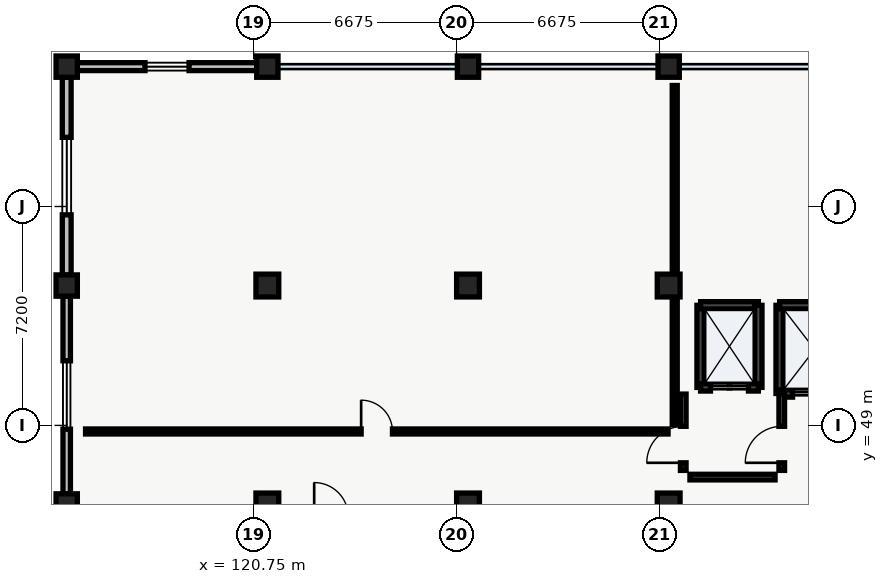
"""IFC4 building model, lengths in metres.
Left out: names, types, materials, properties, quantities, classifications, styles, units other than length and angle.
Written with IfcOpenShell. Run it as: python <this file> out.ifc"""

import sys

from ifc_helpers import new_model, si_unit, direction, frame, frame_2d, origin, origin_2d, place, context, subcontext, project, spatial, rectangle, extrude, element, fill, save


model = new_model("IFC4")
c1 = context("Model", 3, precision=1e-05, world=origin(), true_north=direction((0.0, 1.0)))
c2 = subcontext(c1, "Body", "Model", "MODEL_VIEW")
j1 = project(units=[si_unit("LENGTHUNIT", "METRE"), si_unit("PLANEANGLEUNIT", "RADIAN")], contexts=[c1])
p1 = place(None, origin())
s1 = spatial("IfcSite", under=j1, at=p1, CompositionType="ELEMENT")
p2 = place(p1, origin())
s2 = spatial("IfcBuilding", under=s1, at=p2, CompositionType="ELEMENT")
p3 = place(p2, frame((0.0, 0.0, 5.1)))
s3 = spatial("IfcBuildingStorey", under=s2, at=p3, CompositionType="ELEMENT", Elevation=5.1)
for number, where, z_axis, x_axis in (
    (1, (114.6, 46.4, 0.0), (0.0, 0.0, 1.0), (1.0, 0.0, 0.0)),
    (2, (114.6, 53.6, 0.0), (0.0, 0.0, 1.0), (1.0, 0.0, 0.0)),
    (3, (114.6, 60.8, 0.0), (0.0, 0.0, 1.0), (1.0, 0.0, 0.0)),
):
    element("IfcColumn", number, at=place(p3, frame(where, z_axis=z_axis, x_axis=x_axis)), inside=s3, PredefinedType="COLUMN", context=c2, shape_type="SweptSolid", body=[
        extrude(rectangle(XDim=0.7, YDim=0.7, at=origin_2d()), origin(), (0.0, 0.0, 1.0), 4.29),
    ])
for number, where, z_axis, x_axis in (
    (4, (121.2, 46.4, 0.0), (0.0, 0.0, 1.0), (1.0, 0.0, 0.0)),
    (5, (121.2, 53.6, 0.0), (0.0, 0.0, 1.0), (1.0, 0.0, 0.0)),
):
    element("IfcColumn", number, at=place(p3, frame(where, z_axis=z_axis, x_axis=x_axis)), inside=s3, PredefinedType="COLUMN", context=c2, shape_type="SweptSolid", body=[
        extrude(rectangle(XDim=0.75, YDim=0.75, at=origin_2d()), origin(), (0.0, 0.0, 1.0), 4.29),
    ])
p4 = place(p3, frame((121.2, 60.8, 0.0), z_axis=(0.0, 0.0, 1.0), x_axis=(1.0, 0.0, 0.0)))
e6 = element("IfcColumn", 6, at=p4, inside=s3, PredefinedType="COLUMN", context=c2, shape_type="SweptSolid", body=[
    extrude(rectangle(XDim=0.7, YDim=0.7, at=origin_2d()), origin(), (0.0, 0.0, 1.0), 4.29),
])
for number, where, z_axis, x_axis in (
    (7, (127.8, 46.4, 0.0), (0.0, 0.0, 1.0), (1.0, 0.0, 0.0)),
    (8, (127.8, 53.6, 0.0), (0.0, 0.0, 1.0), (1.0, 0.0, 0.0)),
):
    element("IfcColumn", number, at=place(p3, frame(where, z_axis=z_axis, x_axis=x_axis)), inside=s3, PredefinedType="COLUMN", context=c2, shape_type="SweptSolid", body=[
        extrude(rectangle(XDim=0.75, YDim=0.75, at=origin_2d()), origin(), (0.0, 0.0, 1.0), 4.29),
    ])
p5 = place(p3, frame((127.8, 60.8, 0.0), z_axis=(0.0, 0.0, 1.0), x_axis=(1.0, 0.0, 0.0)))
e9 = element("IfcColumn", 9, at=p5, inside=s3, PredefinedType="COLUMN", context=c2, shape_type="SweptSolid", body=[
    extrude(rectangle(XDim=0.7, YDim=0.7, at=origin_2d()), origin(), (0.0, 0.0, 1.0), 4.29),
])
for number, where, z_axis, x_axis in (
    (10, (134.4, 46.4, 0.0), (0.0, 0.0, 1.0), (1.0, 0.0, 0.0)),
    (11, (134.4, 53.6, 0.0), (0.0, 0.0, 1.0), (1.0, 0.0, 0.0)),
):
    element("IfcColumn", number, at=place(p3, frame(where, z_axis=z_axis, x_axis=x_axis)), inside=s3, PredefinedType="COLUMN", context=c2, shape_type="SweptSolid", body=[
        extrude(rectangle(XDim=0.75, YDim=0.75, at=origin_2d()), origin(), (0.0, 0.0, 1.0), 4.29),
    ])
p6 = place(p3, frame((134.4, 60.8, 0.0), z_axis=(0.0, 0.0, 1.0), x_axis=(1.0, 0.0, 0.0)))
e12 = element("IfcColumn", 12, at=p6, inside=s3, PredefinedType="COLUMN", context=c2, shape_type="SweptSolid", body=[
    extrude(rectangle(XDim=0.7, YDim=0.7, at=origin_2d()), origin(), (0.0, 0.0, 1.0), 4.29),
])
p7 = place(p3, frame((114.6, 46.745, 0.0), z_axis=(0.0, 0.0, 1.0), x_axis=(0.0, 1.0, 0.0)))
e13 = element("IfcWall", 13, at=p7, inside=s3, PredefinedType="STANDARD", context=c2, shape_type="SweptSolid", body=[
    extrude(rectangle(XDim=6.51, YDim=0.245, at=frame_2d((3.255, 0.0))), origin(), (0.0, 0.0, 1.0), 3.775),
])
p8 = place(p7, frame((2.13, 0.0, 0.95)))
e14 = element("IfcOpeningElement", 14, at=p8, cuts=e13, PredefinedType="OPENING", context=c2, shape_type="SweptSolid", body=[
    extrude(rectangle(XDim=2.25, YDim=1.55, at=frame_2d((1.125, 0.775))), frame((0.0, 0.123, 0.0), z_axis=(0.0, -1.0, 0.0), x_axis=(1.0, 0.0, 0.0)), (0.0, 0.0, 1.0), 0.245),
])
p9 = place(p3, frame((114.6, 53.945, 0.0), z_axis=(0.0, 0.0, 1.0), x_axis=(0.0, 1.0, 0.0)))
e15 = element("IfcWall", 15, at=p9, inside=s3, PredefinedType="STANDARD", context=c2, shape_type="SweptSolid", body=[
    extrude(rectangle(XDim=6.51, YDim=0.29, at=frame_2d((3.255, 0.0))), origin(), (0.0, 0.0, 1.0), 3.775),
])
p10 = place(p9, frame((1.98, 0.0, 0.95)))
e16 = element("IfcOpeningElement", 16, at=p10, cuts=e15, PredefinedType="OPENING", context=c2, shape_type="SweptSolid", body=[
    extrude(rectangle(XDim=2.55, YDim=1.75, at=frame_2d((1.275, 0.875))), frame((0.0, 0.145, 0.0), z_axis=(0.0, -1.0, 0.0), x_axis=(1.0, 0.0, 0.0)), (0.0, 0.0, 1.0), 0.29),
])
p11 = place(p3, frame((114.945, 60.8, 0.0), z_axis=(0.0, 0.0, 1.0), x_axis=(1.0, 0.0, 0.0)))
e17 = element("IfcWall", 17, at=p11, inside=s3, PredefinedType="STANDARD", context=c2, shape_type="SweptSolid", body=[
    extrude(rectangle(XDim=5.91, YDim=0.26, at=frame_2d((2.955, 0.0))), origin(), (0.0, 0.0, 1.0), 3.775),
])
p12 = place(p11, frame((2.23, 0.0, 0.95)))
e18 = element("IfcOpeningElement", 18, at=p12, cuts=e17, PredefinedType="OPENING", context=c2, shape_type="SweptSolid", body=[
    extrude(rectangle(XDim=1.45, YDim=1.35, at=frame_2d((0.725, 0.675))), frame((0.0, 0.13, 0.0), z_axis=(0.0, -1.0, 0.0), x_axis=(1.0, 0.0, 0.0)), (0.0, 0.0, 1.0), 0.26),
])
p13 = place(p3, frame((135.45, 50.25, 0.0), z_axis=(0.0, 0.0, 1.0), x_axis=(0.0, 1.0, 0.0)))
e19 = element("IfcWall", 19, at=p13, inside=s3, PredefinedType="SHEAR", context=c2, shape_type="SweptSolid", body=[
    extrude(rectangle(XDim=2.7, YDim=0.24, at=frame_2d((1.35, 0.0))), origin(), (0.0, 0.0, 1.0), 4.28),
])
p14 = place(p3, frame((135.45, 52.95, 0.0), z_axis=(0.0, 0.0, 1.0), x_axis=(1.0, 0.0, 0.0)))
e20 = element("IfcWall", 20, at=p14, inside=s3, PredefinedType="SHEAR", context=c2, shape_type="SweptSolid", body=[
    extrude(rectangle(XDim=1.9, YDim=0.24, at=frame_2d((0.95, 0.0))), origin(), (0.0, 0.0, 1.0), 4.28),
])
p15 = place(p3, frame((137.35, 52.95, 0.0), z_axis=(0.0, 0.0, 1.0), x_axis=(0.0, -1.0, 0.0)))
e21 = element("IfcWall", 21, at=p15, inside=s3, PredefinedType="SHEAR", context=c2, shape_type="SweptSolid", body=[
    extrude(rectangle(XDim=2.7, YDim=0.24, at=frame_2d((1.35, 0.0))), origin(), (0.0, 0.0, 1.0), 4.28),
])
p16 = place(p3, frame((137.35, 50.25, 0.0), z_axis=(0.0, 0.0, 1.0), x_axis=(-1.0, 0.0, 0.0)))
e22 = element("IfcWall", 22, at=p16, inside=s3, PredefinedType="SHEAR", context=c2, shape_type="SweptSolid", body=[
    extrude(rectangle(XDim=1.9, YDim=0.24, at=frame_2d((0.95, 0.0))), origin(), (0.0, 0.0, 1.0), 4.28),
])
p17 = place(p16, frame((0.325, 0.0, 0.0)))
e23 = element("IfcOpeningElement", 23, at=p17, cuts=e22, PredefinedType="OPENING", context=c2, shape_type="SweptSolid", body=[
    extrude(rectangle(XDim=1.25, YDim=2.2, at=frame_2d((0.625, 1.1))), frame((0.0, 0.12, 0.0), z_axis=(0.0, -1.0, 0.0), x_axis=(1.0, 0.0, 0.0)), (0.0, 0.0, 1.0), 0.24),
])
p18 = place(p3, frame((138.05, 50.05, 0.0), z_axis=(0.0, 0.0, 1.0), x_axis=(0.0, 1.0, 0.0)))
e24 = element("IfcWall", 24, at=p18, inside=s3, PredefinedType="SHEAR", context=c2, shape_type="SweptSolid", body=[
    extrude(rectangle(XDim=2.9, YDim=0.24, at=frame_2d((1.45, 0.0))), origin(), (0.0, 0.0, 1.0), 4.28),
])
p19 = place(p3, frame((138.05, 52.95, 0.0), z_axis=(0.0, 0.0, 1.0), x_axis=(1.0, 0.0, 0.0)))
e25 = element("IfcWall", 25, at=p19, inside=s3, PredefinedType="SHEAR", context=c2, shape_type="SweptSolid", body=[
    extrude(rectangle(XDim=2.3, YDim=0.24, at=frame_2d((1.15, 0.0))), origin(), (0.0, 0.0, 1.0), 4.28),
])
p20 = place(p3, frame((140.35, 50.05, 0.0), z_axis=(0.0, 0.0, 1.0), x_axis=(-1.0, 0.0, 0.0)))
e26 = element("IfcWall", 26, at=p20, inside=s3, PredefinedType="SHEAR", context=c2, shape_type="SweptSolid", body=[
    extrude(rectangle(XDim=2.3, YDim=0.24, at=frame_2d((1.15, 0.0))), origin(), (0.0, 0.0, 1.0), 4.28),
])
p21 = place(p20, frame((0.425, 0.0, 0.0)))
e27 = element("IfcOpeningElement", 27, at=p21, cuts=e26, PredefinedType="OPENING", context=c2, shape_type="SweptSolid", body=[
    extrude(rectangle(XDim=1.45, YDim=2.3, at=frame_2d((0.725, 1.15))), frame((0.0, 0.12, 0.0), z_axis=(0.0, -1.0, 0.0), x_axis=(1.0, 0.0, 0.0)), (0.0, 0.0, 1.0), 0.24),
])
p22 = place(p3, frame((135.1, 47.3, 0.0), z_axis=(0.0, 0.0, 1.0), x_axis=(1.0, 0.0, 0.0)))
e28 = element("IfcWall", 28, at=p22, inside=s3, PredefinedType="SOLIDWALL", context=c2, shape_type="SweptSolid", body=[
    extrude(rectangle(XDim=2.8, YDim=0.185, at=frame_2d((1.4, 0.0))), origin(), (0.0, 0.0, 1.0), 3.95),
])
p23 = place(p3, frame((138.12, 47.52, 0.0), z_axis=(0.0, 0.0, 1.0), x_axis=(0.0, 1.0, 0.0)))
e29 = element("IfcWall", 29, at=p23, inside=s3, PredefinedType="SOLIDWALL", context=c2, shape_type="SweptSolid", body=[
    extrude(rectangle(XDim=2.51, YDim=0.185, at=frame_2d((1.255, 0.0))), origin(), (0.0, 0.0, 1.0), 3.95),
])
p24 = place(p23, frame((0.25, 0.0, 0.0)))
e30 = element("IfcOpeningElement", 30, at=p24, cuts=e29, PredefinedType="OPENING", context=c2, shape_type="SweptSolid", body=[
    extrude(rectangle(XDim=1.2, YDim=2.15, at=frame_2d((0.6, 1.075))), frame((0.0, 0.093, 0.0), z_axis=(0.0, -1.0, 0.0), x_axis=(1.0, 0.0, 0.0)), (0.0, 0.0, 1.0), 0.185),
])
p25 = place(p3, frame((134.88, 50.03, 0.0), z_axis=(0.0, 0.0, 1.0), x_axis=(0.0, -1.0, 0.0)))
e31 = element("IfcWall", 31, at=p25, inside=s3, PredefinedType="SOLIDWALL", context=c2, shape_type="SweptSolid", body=[
    extrude(rectangle(XDim=2.51, YDim=0.185, at=frame_2d((1.255, 0.0))), origin(), (0.0, 0.0, 1.0), 3.95),
])
p26 = place(p25, frame((1.06, 0.0, 0.0)))
e32 = element("IfcOpeningElement", 32, at=p26, cuts=e31, PredefinedType="OPENING", context=c2, shape_type="SweptSolid", body=[
    extrude(rectangle(XDim=1.2, YDim=2.15, at=frame_2d((0.6, 1.075))), frame((0.0, 0.093, 0.0), z_axis=(0.0, -1.0, 0.0), x_axis=(1.0, 0.0, 0.0)), (0.0, 0.0, 1.0), 0.185),
])
p27 = place(p3, frame((115.22, 48.8, 0.0), z_axis=(0.0, 0.0, 1.0), x_axis=(1.0, 0.0, 0.0)))
e33 = element("IfcWall", 33, at=p27, inside=s3, PredefinedType="PARTITIONING", context=c2, shape_type="SweptSolid", body=[
    extrude(rectangle(XDim=19.16, YDim=0.165, at=frame_2d((9.58, 0.0))), origin(), (0.0, 0.0, 1.0), 3.875),
])
p28 = place(p27, frame((9.065, 0.0, 0.0)))
e34 = element("IfcOpeningElement", 34, at=p28, cuts=e33, PredefinedType="OPENING", context=c2, shape_type="SweptSolid", body=[
    extrude(rectangle(XDim=1.03, YDim=2.16, at=frame_2d((0.515, 1.08))), frame((0.0, 0.083, 0.0), z_axis=(0.0, -1.0, 0.0), x_axis=(1.0, 0.0, 0.0)), (0.0, 0.0, 1.0), 0.165),
])
p29 = place(p3, frame((134.6, 49.02, 0.0), z_axis=(0.0, 0.0, 1.0), x_axis=(0.0, 1.0, 0.0)))
e35 = element("IfcWall", 35, at=p29, inside=s3, PredefinedType="PARTITIONING", context=c2, shape_type="SweptSolid", body=[
    extrude(rectangle(XDim=11.16, YDim=0.165, at=frame_2d((5.58, 0.0))), origin(), (0.0, 0.0, 1.0), 3.625),
])
p30 = place(p8, origin())
e36 = element("IfcWindow", 36, at=p30, inside=s3, PartitioningType="SINGLE_PANEL", PredefinedType="WINDOW", context=c2, shape_type="SweptSolid", body=[
    extrude(rectangle(XDim=2.25, YDim=1.55, at=frame_2d((1.125, 0.775))), frame((0.0, 0.03, 0.0), z_axis=(0.0, -1.0, 0.0), x_axis=(1.0, 0.0, 0.0)), (0.0, 0.0, 1.0), 0.06),
])
fill(e14, e36)
p31 = place(p10, origin())
e37 = element("IfcWindow", 37, at=p31, inside=s3, PartitioningType="SINGLE_PANEL", PredefinedType="WINDOW", context=c2, shape_type="SweptSolid", body=[
    extrude(rectangle(XDim=2.55, YDim=1.75, at=frame_2d((1.275, 0.875))), frame((0.0, 0.03, 0.0), z_axis=(0.0, -1.0, 0.0), x_axis=(1.0, 0.0, 0.0)), (0.0, 0.0, 1.0), 0.06),
])
fill(e16, e37)
p32 = place(p12, origin())
e38 = element("IfcWindow", 38, at=p32, inside=s3, PartitioningType="SINGLE_PANEL", PredefinedType="WINDOW", context=c2, shape_type="SweptSolid", body=[
    extrude(rectangle(XDim=1.45, YDim=1.35, at=frame_2d((0.725, 0.675))), frame((0.0, 0.03, 0.0), z_axis=(0.0, -1.0, 0.0), x_axis=(1.0, 0.0, 0.0)), (0.0, 0.0, 1.0), 0.06),
])
fill(e18, e38)
p33 = place(p17, origin())
e39 = element("IfcDoor", 39, at=p33, inside=s3, OperationType="SLIDING_TO_RIGHT", PredefinedType="DOOR", context=c2, shape_type="SweptSolid", body=[
    extrude(rectangle(XDim=1.25, YDim=2.2, at=frame_2d((0.625, 1.1))), frame((0.0, 0.025, 0.0), z_axis=(0.0, -1.0, 0.0), x_axis=(1.0, 0.0, 0.0)), (0.0, 0.0, 1.0), 0.05),
])
fill(e23, e39)
p34 = place(p21, origin())
e40 = element("IfcDoor", 40, at=p34, inside=s3, OperationType="DOUBLE_DOOR_SLIDING", PredefinedType="DOOR", context=c2, shape_type="SweptSolid", body=[
    extrude(rectangle(XDim=1.45, YDim=2.3, at=frame_2d((0.725, 1.15))), frame((0.0, 0.025, 0.0), z_axis=(0.0, -1.0, 0.0), x_axis=(1.0, 0.0, 0.0)), (0.0, 0.0, 1.0), 0.05),
])
fill(e27, e40)
p35 = place(p24, origin())
e41 = element("IfcDoor", 41, at=p35, inside=s3, OperationType="SINGLE_SWING_LEFT", PredefinedType="DOOR", context=c2, shape_type="SweptSolid", body=[
    extrude(rectangle(XDim=1.2, YDim=2.15, at=frame_2d((0.6, 1.075))), frame((0.0, 0.025, 0.0), z_axis=(0.0, -1.0, 0.0), x_axis=(1.0, 0.0, 0.0)), (0.0, 0.0, 1.0), 0.05),
])
fill(e30, e41)
p36 = place(p26, origin())
e42 = element("IfcDoor", 42, at=p36, inside=s3, OperationType="SINGLE_SWING_RIGHT", PredefinedType="DOOR", context=c2, shape_type="SweptSolid", body=[
    extrude(rectangle(XDim=1.2, YDim=2.15, at=frame_2d((0.6, 1.075))), frame((0.0, 0.025, 0.0), z_axis=(0.0, -1.0, 0.0), x_axis=(1.0, 0.0, 0.0)), (0.0, 0.0, 1.0), 0.05),
])
fill(e32, e42)
p37 = place(p28, origin())
e43 = element("IfcDoor", 43, at=p37, inside=s3, OperationType="SINGLE_SWING_LEFT", PredefinedType="DOOR", context=c2, shape_type="SweptSolid", body=[
    extrude(rectangle(XDim=1.03, YDim=2.16, at=frame_2d((0.515, 1.08))), frame((0.0, 0.025, 0.0), z_axis=(0.0, -1.0, 0.0), x_axis=(1.0, 0.0, 0.0)), (0.0, 0.0, 1.0), 0.05),
])
fill(e34, e43)
save(model, sys.argv[1])
